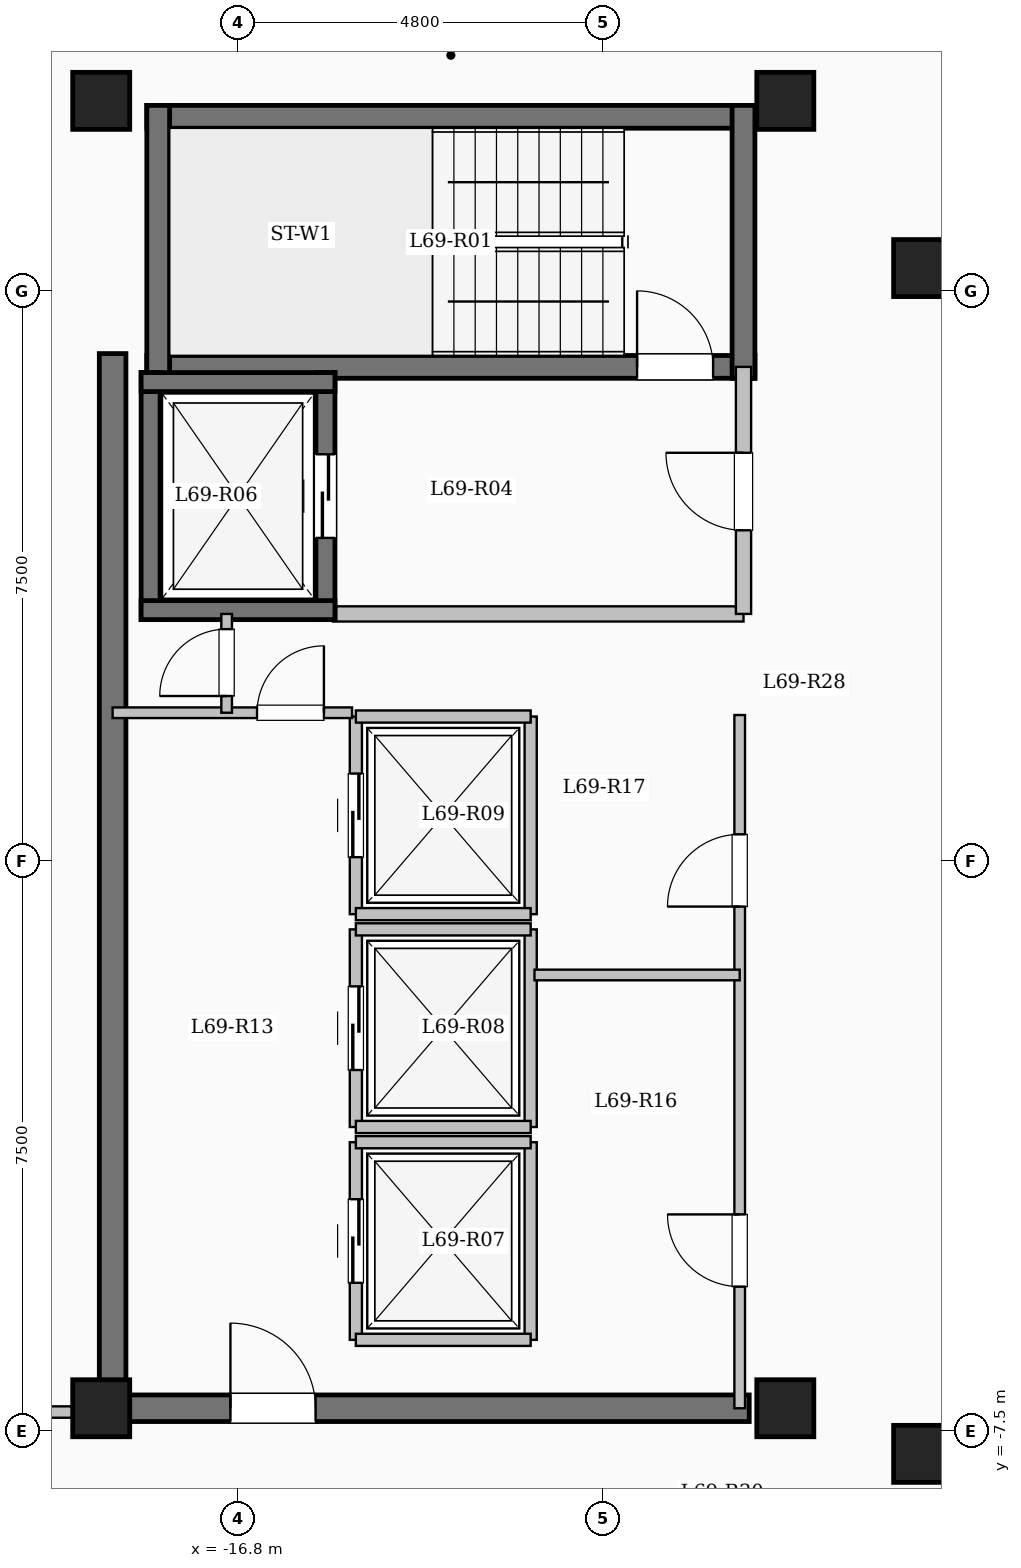
"""IFC4 building model, lengths in metres.
Left out: names, types, materials, properties, quantities, classifications, styles, units other than length and angle.
Written with IfcOpenShell. Run it as: python <this file> out.ifc"""

import sys

from ifc_helpers import new_model, si_unit, direction, frame, frame_2d, origin, origin_2d, place, context, subcontext, project, spatial, rectangle, extrude, element, fill, save


model = new_model("IFC4")
c1 = context("Model", 3, precision=1e-05, world=origin(), true_north=direction((0.0, 1.0)))
c2 = subcontext(c1, "Body", "Model", "MODEL_VIEW")
j1 = project(units=[si_unit("LENGTHUNIT", "METRE"), si_unit("PLANEANGLEUNIT", "RADIAN")], contexts=[c1])
p1 = place(None, origin())
s1 = spatial("IfcSite", under=j1, at=p1, CompositionType="ELEMENT")
p2 = place(p1, origin())
s2 = spatial("IfcBuilding", under=s1, at=p2, CompositionType="ELEMENT")
p3 = place(p2, frame((0.0, 0.0, 254.9)))
s3 = spatial("IfcBuildingStorey", under=s2, at=p3, CompositionType="ELEMENT", Elevation=254.9)
for number, where, z_axis, x_axis in (
    (1, (-7.8, -7.8, 0.0), (0.0, 0.0, 1.0), (1.0, 0.0, 0.0)),
    (2, (-7.8, 7.8, 0.0), (0.0, 0.0, 1.0), (1.0, 0.0, 0.0)),
    (3, (-9.6, -7.2, 0.0), (0.0, 0.0, 1.0), (1.0, 0.0, 0.0)),
    (4, (-9.6, 10.0, 0.0), (0.0, 0.0, 1.0), (1.0, 0.0, 0.0)),
    (5, (-18.6, -7.2, 0.0), (0.0, 0.0, 1.0), (1.0, 0.0, 0.0)),
    (6, (-18.6, 10.0, 0.0), (0.0, 0.0, 1.0), (1.0, 0.0, 0.0)),
):
    element("IfcColumn", number, at=place(p3, frame(where, z_axis=z_axis, x_axis=x_axis)), inside=s3, PredefinedType="COLUMN", context=c2, shape_type="SweptSolid", body=[
        extrude(rectangle(XDim=0.75, YDim=0.75, at=origin_2d()), origin(), (0.0, 0.0, 1.0), 3.35),
    ])
p4 = place(p3, frame((-18.0, 9.79, 0.0), z_axis=(0.0, 0.0, 1.0), x_axis=(1.0, 0.0, 0.0)))
e7 = element("IfcWall", 7, at=p4, inside=s3, PredefinedType="SHEAR", context=c2, shape_type="SweptSolid", body=[
    extrude(rectangle(XDim=8.0, YDim=0.3, at=frame_2d((4.0, 0.0))), origin(), (0.0, 0.0, 1.0), 3.35),
])
p5 = place(p3, frame((-18.0, 6.5, 0.0), z_axis=(0.0, 0.0, 1.0), x_axis=(1.0, 0.0, 0.0)))
e8 = element("IfcWall", 8, at=p5, inside=s3, PredefinedType="SHEAR", context=c2, shape_type="SweptSolid", body=[
    extrude(rectangle(XDim=8.0, YDim=0.3, at=frame_2d((4.0, 0.0))), origin(), (0.0, 0.0, 1.0), 3.35),
])
p6 = place(p5, frame((6.45, 0.0, 0.0)))
e9 = element("IfcOpeningElement", 9, at=p6, cuts=e8, PredefinedType="OPENING", context=c2, shape_type="SweptSolid", body=[
    extrude(rectangle(XDim=1.0, YDim=2.15, at=frame_2d((0.5, 1.075))), frame((0.0, 0.16, 0.0), z_axis=(0.0, -1.0, 0.0), x_axis=(1.0, 0.0, 0.0)), (0.0, 0.0, 1.0), 0.32),
])
for number, where, z_axis, x_axis in (
    (10, (-17.85, 6.35, 0.0), (0.0, 0.0, 1.0), (0.0, 1.0, 0.0)),
    (11, (-10.15, 6.35, 0.0), (0.0, 0.0, 1.0), (0.0, 1.0, 0.0)),
):
    element("IfcWall", number, at=place(p3, frame(where, z_axis=z_axis, x_axis=x_axis)), inside=s3, PredefinedType="SHEAR", context=c2, shape_type="SweptSolid", body=[
        extrude(rectangle(XDim=3.59, YDim=0.3, at=frame_2d((1.795, 0.0))), origin(), (0.0, 0.0, 1.0), 3.35),
    ])
p7 = place(p3, frame((-15.55, 3.25, 0.0), z_axis=(0.0, 0.0, 1.0), x_axis=(1.0, 0.0, 0.0)))
e12 = element("IfcWall", 12, at=p7, inside=s3, PredefinedType="SOLIDWALL", context=c2, shape_type="SweptSolid", body=[
    extrude(rectangle(XDim=5.4, YDim=0.2, at=frame_2d((2.7, 0.0))), origin(), (0.0, 0.0, 1.0), 3.1),
])
p8 = place(p3, frame((-10.15, 3.25, 0.0), z_axis=(0.0, 0.0, 1.0), x_axis=(0.0, 1.0, 0.0)))
e13 = element("IfcWall", 13, at=p8, inside=s3, PredefinedType="SOLIDWALL", context=c2, shape_type="SweptSolid", body=[
    extrude(rectangle(XDim=3.25, YDim=0.2, at=frame_2d((1.625, 0.0))), origin(), (0.0, 0.0, 1.0), 3.1),
])
p9 = place(p8, frame((1.1, 0.0, 0.0)))
e14 = element("IfcOpeningElement", 14, at=p9, cuts=e13, PredefinedType="OPENING", context=c2, shape_type="SweptSolid", body=[
    extrude(rectangle(XDim=1.02, YDim=2.15, at=frame_2d((0.51, 1.075))), frame((0.0, 0.11, 0.0), z_axis=(0.0, -1.0, 0.0), x_axis=(1.0, 0.0, 0.0)), (0.0, 0.0, 1.0), 0.22),
])
p10 = place(p3, frame((-17.95, 3.175, 0.0), z_axis=(0.0, 0.0, 1.0), x_axis=(0.0, 1.0, 0.0)))
e15 = element("IfcWall", 15, at=p10, inside=s3, PredefinedType="SHEAR", context=c2, shape_type="SweptSolid", body=[
    extrude(rectangle(XDim=3.25, YDim=0.25, at=frame_2d((1.625, 0.0))), origin(), (0.0, 0.0, 1.0), 3.35),
])
p11 = place(p3, frame((-15.65, 3.175, 0.0), z_axis=(0.0, 0.0, 1.0), x_axis=(0.0, 1.0, 0.0)))
e16 = element("IfcWall", 16, at=p11, inside=s3, PredefinedType="SHEAR", context=c2, shape_type="SweptSolid", body=[
    extrude(rectangle(XDim=3.25, YDim=0.25, at=frame_2d((1.625, 0.0))), origin(), (0.0, 0.0, 1.0), 3.35),
])
p12 = place(p11, frame((1.075, 0.0, 0.0)))
e17 = element("IfcOpeningElement", 17, at=p12, cuts=e16, PredefinedType="OPENING", context=c2, shape_type="SweptSolid", body=[
    extrude(rectangle(XDim=1.1, YDim=2.15, at=frame_2d((0.55, 1.075))), frame((0.0, 0.135, 0.0), z_axis=(0.0, -1.0, 0.0), x_axis=(1.0, 0.0, 0.0)), (0.0, 0.0, 1.0), 0.27),
])
for number, where, z_axis, x_axis in (
    (18, (-18.075, 3.3, 0.0), (0.0, 0.0, 1.0), (1.0, 0.0, 0.0)),
    (19, (-18.075, 6.3, 0.0), (0.0, 0.0, 1.0), (1.0, 0.0, 0.0)),
):
    element("IfcWall", number, at=place(p3, frame(where, z_axis=z_axis, x_axis=x_axis)), inside=s3, PredefinedType="SHEAR", context=c2, shape_type="SweptSolid", body=[
        extrude(rectangle(XDim=2.55, YDim=0.25, at=frame_2d((1.275, 0.0))), origin(), (0.0, 0.0, 1.0), 3.35),
    ])
p13 = place(p3, frame((-15.25, -6.3, 0.0), z_axis=(0.0, 0.0, 1.0), x_axis=(0.0, 1.0, 0.0)))
e20 = element("IfcWall", 20, at=p13, inside=s3, PredefinedType="SOLIDWALL", context=c2, shape_type="SweptSolid", body=[
    extrude(rectangle(XDim=2.6, YDim=0.16, at=frame_2d((1.3, 0.0))), origin(), (0.0, 0.0, 1.0), 3.1),
])
p14 = place(p13, frame((0.75, 0.0, 0.0)))
e21 = element("IfcOpeningElement", 21, at=p14, cuts=e20, PredefinedType="OPENING", context=c2, shape_type="SweptSolid", body=[
    extrude(rectangle(XDim=1.1, YDim=2.15, at=frame_2d((0.55, 1.075))), frame((0.0, 0.09, 0.0), z_axis=(0.0, -1.0, 0.0), x_axis=(1.0, 0.0, 0.0)), (0.0, 0.0, 1.0), 0.18),
])
p15 = place(p3, frame((-12.95, -6.3, 0.0), z_axis=(0.0, 0.0, 1.0), x_axis=(0.0, 1.0, 0.0)))
e22 = element("IfcWall", 22, at=p15, inside=s3, PredefinedType="SOLIDWALL", context=c2, shape_type="SweptSolid", body=[
    extrude(rectangle(XDim=2.6, YDim=0.16, at=frame_2d((1.3, 0.0))), origin(), (0.0, 0.0, 1.0), 3.1),
])
for number, where, z_axis, x_axis in (
    (23, (-15.25, -6.3, 0.0), (0.0, 0.0, 1.0), (1.0, 0.0, 0.0)),
    (24, (-15.25, -3.7, 0.0), (0.0, 0.0, 1.0), (1.0, 0.0, 0.0)),
):
    element("IfcWall", number, at=place(p3, frame(where, z_axis=z_axis, x_axis=x_axis)), inside=s3, PredefinedType="SOLIDWALL", context=c2, shape_type="SweptSolid", body=[
        extrude(rectangle(XDim=2.3, YDim=0.16, at=frame_2d((1.15, 0.0))), origin(), (0.0, 0.0, 1.0), 3.1),
    ])
p16 = place(p3, frame((-15.25, -3.5, 0.0), z_axis=(0.0, 0.0, 1.0), x_axis=(0.0, 1.0, 0.0)))
e25 = element("IfcWall", 25, at=p16, inside=s3, PredefinedType="SOLIDWALL", context=c2, shape_type="SweptSolid", body=[
    extrude(rectangle(XDim=2.6, YDim=0.16, at=frame_2d((1.3, 0.0))), origin(), (0.0, 0.0, 1.0), 3.1),
])
p17 = place(p16, frame((0.75, 0.0, 0.0)))
e26 = element("IfcOpeningElement", 26, at=p17, cuts=e25, PredefinedType="OPENING", context=c2, shape_type="SweptSolid", body=[
    extrude(rectangle(XDim=1.1, YDim=2.15, at=frame_2d((0.55, 1.075))), frame((0.0, 0.09, 0.0), z_axis=(0.0, -1.0, 0.0), x_axis=(1.0, 0.0, 0.0)), (0.0, 0.0, 1.0), 0.18),
])
p18 = place(p3, frame((-12.95, -3.5, 0.0), z_axis=(0.0, 0.0, 1.0), x_axis=(0.0, 1.0, 0.0)))
e27 = element("IfcWall", 27, at=p18, inside=s3, PredefinedType="SOLIDWALL", context=c2, shape_type="SweptSolid", body=[
    extrude(rectangle(XDim=2.6, YDim=0.16, at=frame_2d((1.3, 0.0))), origin(), (0.0, 0.0, 1.0), 3.1),
])
for number, where, z_axis, x_axis in (
    (28, (-15.25, -3.5, 0.0), (0.0, 0.0, 1.0), (1.0, 0.0, 0.0)),
    (29, (-15.25, -0.9, 0.0), (0.0, 0.0, 1.0), (1.0, 0.0, 0.0)),
):
    element("IfcWall", number, at=place(p3, frame(where, z_axis=z_axis, x_axis=x_axis)), inside=s3, PredefinedType="SOLIDWALL", context=c2, shape_type="SweptSolid", body=[
        extrude(rectangle(XDim=2.3, YDim=0.16, at=frame_2d((1.15, 0.0))), origin(), (0.0, 0.0, 1.0), 3.1),
    ])
p19 = place(p3, frame((-15.25, -0.7, 0.0), z_axis=(0.0, 0.0, 1.0), x_axis=(0.0, 1.0, 0.0)))
e30 = element("IfcWall", 30, at=p19, inside=s3, PredefinedType="SOLIDWALL", context=c2, shape_type="SweptSolid", body=[
    extrude(rectangle(XDim=2.6, YDim=0.16, at=frame_2d((1.3, 0.0))), origin(), (0.0, 0.0, 1.0), 3.1),
])
p20 = place(p19, frame((0.75, 0.0, 0.0)))
e31 = element("IfcOpeningElement", 31, at=p20, cuts=e30, PredefinedType="OPENING", context=c2, shape_type="SweptSolid", body=[
    extrude(rectangle(XDim=1.1, YDim=2.15, at=frame_2d((0.55, 1.075))), frame((0.0, 0.09, 0.0), z_axis=(0.0, -1.0, 0.0), x_axis=(1.0, 0.0, 0.0)), (0.0, 0.0, 1.0), 0.18),
])
p21 = place(p3, frame((-12.95, -0.7, 0.0), z_axis=(0.0, 0.0, 1.0), x_axis=(0.0, 1.0, 0.0)))
e32 = element("IfcWall", 32, at=p21, inside=s3, PredefinedType="SOLIDWALL", context=c2, shape_type="SweptSolid", body=[
    extrude(rectangle(XDim=2.6, YDim=0.16, at=frame_2d((1.3, 0.0))), origin(), (0.0, 0.0, 1.0), 3.1),
])
for number, where, z_axis, x_axis in (
    (33, (-15.25, -0.7, 0.0), (0.0, 0.0, 1.0), (1.0, 0.0, 0.0)),
    (34, (-15.25, 1.9, 0.0), (0.0, 0.0, 1.0), (1.0, 0.0, 0.0)),
):
    element("IfcWall", number, at=place(p3, frame(where, z_axis=z_axis, x_axis=x_axis)), inside=s3, PredefinedType="SOLIDWALL", context=c2, shape_type="SweptSolid", body=[
        extrude(rectangle(XDim=2.3, YDim=0.16, at=frame_2d((1.15, 0.0))), origin(), (0.0, 0.0, 1.0), 3.1),
    ])
p22 = place(p3, frame((-18.45, -7.375, 0.0), z_axis=(0.0, 0.0, 1.0), x_axis=(0.0, 1.0, 0.0)))
e35 = element("IfcWall", 35, at=p22, inside=s3, PredefinedType="SHEAR", context=c2, shape_type="SweptSolid", body=[
    extrude(rectangle(XDim=14.05, YDim=0.35, at=frame_2d((7.025, 0.0))), origin(), (0.0, 0.0, 1.0), 3.35),
])
p23 = place(p3, frame((-18.625, -7.2, 0.0), z_axis=(0.0, 0.0, 1.0), x_axis=(1.0, 0.0, 0.0)))
e36 = element("IfcWall", 36, at=p23, inside=s3, PredefinedType="SHEAR", context=c2, shape_type="SweptSolid", body=[
    extrude(rectangle(XDim=8.55, YDim=0.35, at=frame_2d((4.275, 0.0))), origin(), (0.0, 0.0, 1.0), 3.35),
])
p24 = place(p23, frame((1.725, 0.0, 0.0)))
e37 = element("IfcOpeningElement", 37, at=p24, cuts=e36, PredefinedType="OPENING", context=c2, shape_type="SweptSolid", body=[
    extrude(rectangle(XDim=1.12, YDim=2.15, at=frame_2d((0.56, 1.075))), frame((0.0, 0.185, 0.0), z_axis=(0.0, -1.0, 0.0), x_axis=(1.0, 0.0, 0.0)), (0.0, 0.0, 1.0), 0.37),
])
p25 = place(p3, frame((-18.45, 1.95, 0.0), z_axis=(0.0, 0.0, 1.0), x_axis=(1.0, 0.0, 0.0)))
e38 = element("IfcWall", 38, at=p25, inside=s3, PredefinedType="PARTITIONING", context=c2, shape_type="SweptSolid", body=[
    extrude(rectangle(XDim=3.15, YDim=0.14, at=frame_2d((1.575, 0.0))), origin(), (0.0, 0.0, 1.0), 3.1),
])
p26 = place(p25, frame((1.9, 0.0, 0.0)))
e39 = element("IfcOpeningElement", 39, at=p26, cuts=e38, PredefinedType="OPENING", context=c2, shape_type="SweptSolid", body=[
    extrude(rectangle(XDim=0.88, YDim=2.1, at=frame_2d((0.44, 1.05))), frame((0.0, 0.08, 0.0), z_axis=(0.0, -1.0, 0.0), x_axis=(1.0, 0.0, 0.0)), (0.0, 0.0, 1.0), 0.16),
])
p27 = place(p3, frame((-16.95, 1.95, 0.0), z_axis=(0.0, 0.0, 1.0), x_axis=(0.0, 1.0, 0.0)))
e40 = element("IfcWall", 40, at=p27, inside=s3, PredefinedType="PARTITIONING", context=c2, shape_type="SweptSolid", body=[
    extrude(rectangle(XDim=1.3, YDim=0.14, at=frame_2d((0.65, 0.0))), origin(), (0.0, 0.0, 1.0), 3.1),
])
p28 = place(p27, frame((0.22, 0.0, 0.0)))
e41 = element("IfcOpeningElement", 41, at=p28, cuts=e40, PredefinedType="OPENING", context=c2, shape_type="SweptSolid", body=[
    extrude(rectangle(XDim=0.88, YDim=2.1, at=frame_2d((0.44, 1.05))), frame((0.0, 0.08, 0.0), z_axis=(0.0, -1.0, 0.0), x_axis=(1.0, 0.0, 0.0)), (0.0, 0.0, 1.0), 0.16),
])
p29 = place(p3, frame((-10.2, -7.2, 0.0), z_axis=(0.0, 0.0, 1.0), x_axis=(0.0, 1.0, 0.0)))
e42 = element("IfcWall", 42, at=p29, inside=s3, PredefinedType="PARTITIONING", context=c2, shape_type="SweptSolid", body=[
    extrude(rectangle(XDim=9.12, YDim=0.14, at=frame_2d((4.56, 0.0))), origin(), (0.0, 0.0, 1.0), 3.1),
])
p30 = place(p29, frame((1.6, 0.0, 0.0)))
e43 = element("IfcOpeningElement", 43, at=p30, cuts=e42, PredefinedType="OPENING", context=c2, shape_type="SweptSolid", body=[
    extrude(rectangle(XDim=0.95, YDim=2.12, at=frame_2d((0.475, 1.06))), frame((0.0, 0.08, 0.0), z_axis=(0.0, -1.0, 0.0), x_axis=(1.0, 0.0, 0.0)), (0.0, 0.0, 1.0), 0.16),
])
p31 = place(p29, frame((6.6, 0.0, 0.0)))
e44 = element("IfcOpeningElement", 44, at=p31, cuts=e42, PredefinedType="OPENING", context=c2, shape_type="SweptSolid", body=[
    extrude(rectangle(XDim=0.95, YDim=2.12, at=frame_2d((0.475, 1.06))), frame((0.0, 0.08, 0.0), z_axis=(0.0, -1.0, 0.0), x_axis=(1.0, 0.0, 0.0)), (0.0, 0.0, 1.0), 0.16),
])
p32 = place(p3, frame((-12.9, -1.5, 0.0), z_axis=(0.0, 0.0, 1.0), x_axis=(1.0, 0.0, 0.0)))
e45 = element("IfcWall", 45, at=p32, inside=s3, PredefinedType="PARTITIONING", context=c2, shape_type="SweptSolid", body=[
    extrude(rectangle(XDim=2.7, YDim=0.14, at=frame_2d((1.35, 0.0))), origin(), (0.0, 0.0, 1.0), 3.1),
])
p33 = place(p3, frame((-22.68, -7.25, 0.0), z_axis=(0.0, 0.0, 1.0), x_axis=(1.0, 0.0, 0.0)))
e46 = element("IfcWall", 46, at=p33, inside=s3, PredefinedType="PARTITIONING", context=c2, shape_type="SweptSolid", body=[
    extrude(rectangle(XDim=4.23, YDim=0.15, at=frame_2d((2.115, 0.0))), origin(), (0.0, 0.0, 1.0), 3.1),
])
p34 = place(p33, frame((1.63, 0.0, 0.0)))
e47 = element("IfcOpeningElement", 47, at=p34, cuts=e46, PredefinedType="OPENING", context=c2, shape_type="SweptSolid", body=[
    extrude(rectangle(XDim=1.08, YDim=2.15, at=frame_2d((0.54, 1.075))), frame((0.0, 0.085, 0.0), z_axis=(0.0, -1.0, 0.0), x_axis=(1.0, 0.0, 0.0)), (0.0, 0.0, 1.0), 0.17),
])
p35 = place(p6, origin())
e48 = element("IfcDoor", 48, at=p35, inside=s3, OperationType="SINGLE_SWING_LEFT", PredefinedType="DOOR", context=c2, shape_type="SweptSolid", body=[
    extrude(rectangle(XDim=1.0, YDim=2.15, at=frame_2d((0.5, 1.075))), frame((0.0, 0.025, 0.0), z_axis=(0.0, -1.0, 0.0), x_axis=(1.0, 0.0, 0.0)), (0.0, 0.0, 1.0), 0.05),
])
fill(e9, e48)
p36 = place(p9, origin())
e49 = element("IfcDoor", 49, at=p36, inside=s3, OperationType="SINGLE_SWING_RIGHT", PredefinedType="DOOR", context=c2, shape_type="SweptSolid", body=[
    extrude(rectangle(XDim=1.02, YDim=2.15, at=frame_2d((0.51, 1.075))), frame((0.0, 0.025, 0.0), z_axis=(0.0, -1.0, 0.0), x_axis=(1.0, 0.0, 0.0)), (0.0, 0.0, 1.0), 0.05),
])
fill(e14, e49)
p37 = place(p12, origin())
e50 = element("IfcDoor", 50, at=p37, inside=s3, OperationType="SLIDING_TO_LEFT", PredefinedType="DOOR", context=c2, shape_type="SweptSolid", body=[
    extrude(rectangle(XDim=1.1, YDim=2.15, at=frame_2d((0.55, 1.075))), frame((0.0, 0.025, 0.0), z_axis=(0.0, -1.0, 0.0), x_axis=(1.0, 0.0, 0.0)), (0.0, 0.0, 1.0), 0.05),
])
fill(e17, e50)
p38 = place(p14, origin())
e51 = element("IfcDoor", 51, at=p38, inside=s3, OperationType="SLIDING_TO_LEFT", PredefinedType="DOOR", context=c2, shape_type="SweptSolid", body=[
    extrude(rectangle(XDim=1.1, YDim=2.15, at=frame_2d((0.55, 1.075))), frame((0.0, 0.025, 0.0), z_axis=(0.0, -1.0, 0.0), x_axis=(1.0, 0.0, 0.0)), (0.0, 0.0, 1.0), 0.05),
])
fill(e21, e51)
p39 = place(p17, origin())
e52 = element("IfcDoor", 52, at=p39, inside=s3, OperationType="SLIDING_TO_LEFT", PredefinedType="DOOR", context=c2, shape_type="SweptSolid", body=[
    extrude(rectangle(XDim=1.1, YDim=2.15, at=frame_2d((0.55, 1.075))), frame((0.0, 0.025, 0.0), z_axis=(0.0, -1.0, 0.0), x_axis=(1.0, 0.0, 0.0)), (0.0, 0.0, 1.0), 0.05),
])
fill(e26, e52)
p40 = place(p20, origin())
e53 = element("IfcDoor", 53, at=p40, inside=s3, OperationType="SLIDING_TO_LEFT", PredefinedType="DOOR", context=c2, shape_type="SweptSolid", body=[
    extrude(rectangle(XDim=1.1, YDim=2.15, at=frame_2d((0.55, 1.075))), frame((0.0, 0.025, 0.0), z_axis=(0.0, -1.0, 0.0), x_axis=(1.0, 0.0, 0.0)), (0.0, 0.0, 1.0), 0.05),
])
fill(e31, e53)
p41 = place(p24, origin())
e54 = element("IfcDoor", 54, at=p41, inside=s3, OperationType="SINGLE_SWING_LEFT", PredefinedType="DOOR", context=c2, shape_type="SweptSolid", body=[
    extrude(rectangle(XDim=1.12, YDim=2.15, at=frame_2d((0.56, 1.075))), frame((0.0, 0.025, 0.0), z_axis=(0.0, -1.0, 0.0), x_axis=(1.0, 0.0, 0.0)), (0.0, 0.0, 1.0), 0.05),
])
fill(e37, e54)
p42 = place(p26, origin())
e55 = element("IfcDoor", 55, at=p42, inside=s3, OperationType="SINGLE_SWING_RIGHT", PredefinedType="DOOR", context=c2, shape_type="SweptSolid", body=[
    extrude(rectangle(XDim=0.88, YDim=2.1, at=frame_2d((0.44, 1.05))), frame((0.0, 0.025, 0.0), z_axis=(0.0, -1.0, 0.0), x_axis=(1.0, 0.0, 0.0)), (0.0, 0.0, 1.0), 0.05),
])
fill(e39, e55)
p43 = place(p28, origin())
e56 = element("IfcDoor", 56, at=p43, inside=s3, OperationType="SINGLE_SWING_LEFT", PredefinedType="DOOR", context=c2, shape_type="SweptSolid", body=[
    extrude(rectangle(XDim=0.88, YDim=2.1, at=frame_2d((0.44, 1.05))), frame((0.0, 0.025, 0.0), z_axis=(0.0, -1.0, 0.0), x_axis=(1.0, 0.0, 0.0)), (0.0, 0.0, 1.0), 0.05),
])
fill(e41, e56)
p44 = place(p30, origin())
e57 = element("IfcDoor", 57, at=p44, inside=s3, OperationType="SINGLE_SWING_RIGHT", PredefinedType="DOOR", context=c2, shape_type="SweptSolid", body=[
    extrude(rectangle(XDim=0.95, YDim=2.12, at=frame_2d((0.475, 1.06))), frame((0.0, 0.025, 0.0), z_axis=(0.0, -1.0, 0.0), x_axis=(1.0, 0.0, 0.0)), (0.0, 0.0, 1.0), 0.05),
])
fill(e43, e57)
p45 = place(p31, origin())
e58 = element("IfcDoor", 58, at=p45, inside=s3, OperationType="SINGLE_SWING_LEFT", PredefinedType="DOOR", context=c2, shape_type="SweptSolid", body=[
    extrude(rectangle(XDim=0.95, YDim=2.12, at=frame_2d((0.475, 1.06))), frame((0.0, 0.025, 0.0), z_axis=(0.0, -1.0, 0.0), x_axis=(1.0, 0.0, 0.0)), (0.0, 0.0, 1.0), 0.05),
])
fill(e44, e58)
save(model, sys.argv[1])
